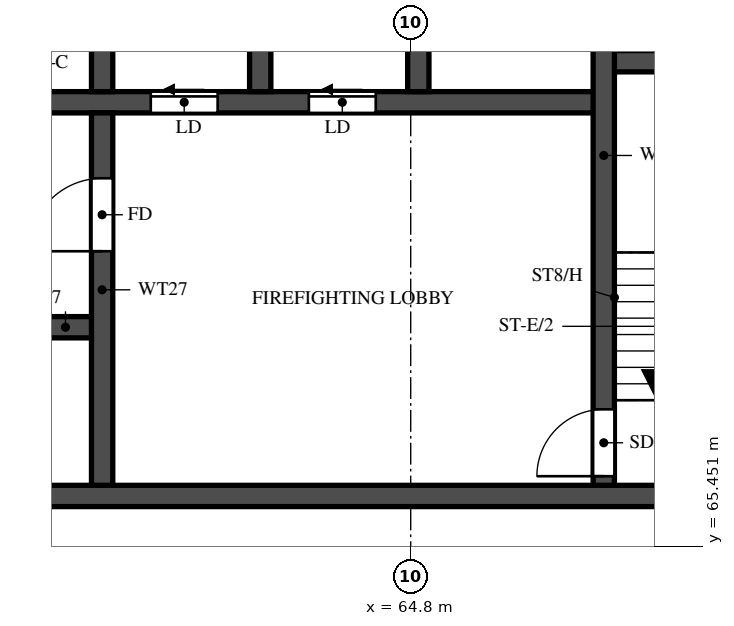
"""IFC4 building model, lengths in metres.
Left out: names, types, materials, properties, quantities, classifications, styles, units other than length and angle.
Written with IfcOpenShell. Run it as: python <this file> out.ifc"""

import sys

from ifc_helpers import new_model, si_unit, direction, frame, frame_2d, origin, place, context, subcontext, project, spatial, rectangle, extrude, element, fill, save


model = new_model("IFC4")
c1 = context("Model", 3, precision=1e-05, world=origin(), true_north=direction((0.0, 1.0)))
c2 = subcontext(c1, "Body", "Model", "MODEL_VIEW")
j1 = project(units=[si_unit("LENGTHUNIT", "METRE"), si_unit("PLANEANGLEUNIT", "RADIAN")], contexts=[c1])
p1 = place(None, origin())
s1 = spatial("IfcSite", under=j1, at=p1, CompositionType="ELEMENT")
p2 = place(p1, origin())
s2 = spatial("IfcBuilding", under=s1, at=p2, CompositionType="ELEMENT")
p3 = place(p2, frame((0.0, 0.0, 174.5)))
s3 = spatial("IfcBuildingStorey", under=s2, at=p3, CompositionType="ELEMENT", Elevation=174.5)
p4 = place(p3, frame((29.7, 66.275, 0.0), z_axis=(0.0, 0.0, 1.0), x_axis=(1.0, 0.0, 0.0)))
e1 = element("IfcWall", 1, at=p4, inside=s3, PredefinedType="SHEAR", context=c2, shape_type="SweptSolid", body=[
    extrude(rectangle(XDim=41.4, YDim=0.35, at=frame_2d((20.7, 0.0))), origin(), (0.0, 0.0, 1.0), 3.2),
])
p5 = place(p4, frame((0.925, 0.0, 0.0)))
e2 = element("IfcOpeningElement", 2, at=p5, cuts=e1, PredefinedType="OPENING", context=c2, shape_type="SweptSolid", body=[
    extrude(rectangle(XDim=1.1, YDim=2.1, at=frame_2d((0.55, 1.05))), frame((0.0, 0.185, 0.0), z_axis=(0.0, -1.0, 0.0), x_axis=(1.0, 0.0, 0.0)), (0.0, 0.0, 1.0), 0.37),
])
p6 = place(p4, frame((3.712, 0.0, 0.0)))
e3 = element("IfcOpeningElement", 3, at=p6, cuts=e1, PredefinedType="OPENING", context=c2, shape_type="SweptSolid", body=[
    extrude(rectangle(XDim=1.8, YDim=2.1, at=frame_2d((0.9, 1.05))), frame((0.0, 0.185, 0.0), z_axis=(0.0, -1.0, 0.0), x_axis=(1.0, 0.0, 0.0)), (0.0, 0.0, 1.0), 0.37),
])
p7 = place(p3, frame((35.625, 69.05, 0.0), z_axis=(0.0, 0.0, 1.0), x_axis=(1.0, 0.0, 0.0)))
e4 = element("IfcWall", 4, at=p7, inside=s3, PredefinedType="SHEAR", context=c2, shape_type="SweptSolid", body=[
    extrude(rectangle(XDim=24.1, YDim=0.35, at=frame_2d((12.05, 0.0))), origin(), (0.0, 0.0, 1.0), 3.2),
])
p8 = place(p7, frame((1.0, 0.0, 0.0)))
e5 = element("IfcOpeningElement", 5, at=p8, cuts=e4, PredefinedType="OPENING", context=c2, shape_type="SweptSolid", body=[
    extrude(rectangle(XDim=1.1, YDim=2.1, at=frame_2d((0.55, 1.05))), frame((0.0, 0.185, 0.0), z_axis=(0.0, -1.0, 0.0), x_axis=(1.0, 0.0, 0.0)), (0.0, 0.0, 1.0), 0.37),
])
p9 = place(p7, frame((3.75, 0.0, 0.0)))
e6 = element("IfcOpeningElement", 6, at=p9, cuts=e4, PredefinedType="OPENING", context=c2, shape_type="SweptSolid", body=[
    extrude(rectangle(XDim=1.1, YDim=2.1, at=frame_2d((0.55, 1.05))), frame((0.0, 0.185, 0.0), z_axis=(0.0, -1.0, 0.0), x_axis=(1.0, 0.0, 0.0)), (0.0, 0.0, 1.0), 0.37),
])
p10 = place(p7, frame((6.5, 0.0, 0.0)))
e7 = element("IfcOpeningElement", 7, at=p10, cuts=e4, PredefinedType="OPENING", context=c2, shape_type="SweptSolid", body=[
    extrude(rectangle(XDim=1.1, YDim=2.1, at=frame_2d((0.55, 1.05))), frame((0.0, 0.185, 0.0), z_axis=(0.0, -1.0, 0.0), x_axis=(1.0, 0.0, 0.0)), (0.0, 0.0, 1.0), 0.37),
])
p11 = place(p7, frame((9.25, 0.0, 0.0)))
e8 = element("IfcOpeningElement", 8, at=p11, cuts=e4, PredefinedType="OPENING", context=c2, shape_type="SweptSolid", body=[
    extrude(rectangle(XDim=1.1, YDim=2.1, at=frame_2d((0.55, 1.05))), frame((0.0, 0.185, 0.0), z_axis=(0.0, -1.0, 0.0), x_axis=(1.0, 0.0, 0.0)), (0.0, 0.0, 1.0), 0.37),
])
p12 = place(p7, frame((12.0, 0.0, 0.0)))
e9 = element("IfcOpeningElement", 9, at=p12, cuts=e4, PredefinedType="OPENING", context=c2, shape_type="SweptSolid", body=[
    extrude(rectangle(XDim=1.1, YDim=2.1, at=frame_2d((0.55, 1.05))), frame((0.0, 0.185, 0.0), z_axis=(0.0, -1.0, 0.0), x_axis=(1.0, 0.0, 0.0)), (0.0, 0.0, 1.0), 0.37),
])
p13 = place(p7, frame((14.75, 0.0, 0.0)))
e10 = element("IfcOpeningElement", 10, at=p13, cuts=e4, PredefinedType="OPENING", context=c2, shape_type="SweptSolid", body=[
    extrude(rectangle(XDim=1.1, YDim=2.1, at=frame_2d((0.55, 1.05))), frame((0.0, 0.185, 0.0), z_axis=(0.0, -1.0, 0.0), x_axis=(1.0, 0.0, 0.0)), (0.0, 0.0, 1.0), 0.37),
])
p14 = place(p7, frame((17.625, 0.0, 0.0)))
e11 = element("IfcOpeningElement", 11, at=p14, cuts=e4, PredefinedType="OPENING", context=c2, shape_type="SweptSolid", body=[
    extrude(rectangle(XDim=1.1, YDim=2.1, at=frame_2d((0.55, 1.05))), frame((0.0, 0.185, 0.0), z_axis=(0.0, -1.0, 0.0), x_axis=(1.0, 0.0, 0.0)), (0.0, 0.0, 1.0), 0.37),
])
p15 = place(p7, frame((20.625, 0.0, 0.0)))
e12 = element("IfcOpeningElement", 12, at=p15, cuts=e4, PredefinedType="OPENING", context=c2, shape_type="SweptSolid", body=[
    extrude(rectangle(XDim=1.1, YDim=2.1, at=frame_2d((0.55, 1.05))), frame((0.0, 0.185, 0.0), z_axis=(0.0, -1.0, 0.0), x_axis=(1.0, 0.0, 0.0)), (0.0, 0.0, 1.0), 0.37),
])
p16 = place(p3, frame((32.825, 72.75, 0.0), z_axis=(0.0, 0.0, 1.0), x_axis=(1.0, 0.0, 0.0)))
e13 = element("IfcWall", 13, at=p16, inside=s3, PredefinedType="SHEAR", context=c2, shape_type="SweptSolid", body=[
    extrude(rectangle(XDim=35.15, YDim=0.35, at=frame_2d((17.575, 0.0))), origin(), (0.0, 0.0, 1.0), 3.2),
])
p17 = place(p16, frame((19.8, 0.0, 0.0)))
e14 = element("IfcOpeningElement", 14, at=p17, cuts=e13, PredefinedType="OPENING", context=c2, shape_type="SweptSolid", body=[
    extrude(rectangle(XDim=1.1, YDim=2.1, at=frame_2d((0.55, 1.05))), frame((0.0, 0.185, 0.0), z_axis=(0.0, -1.0, 0.0), x_axis=(1.0, 0.0, 0.0)), (0.0, 0.0, 1.0), 0.37),
])
p18 = place(p16, frame((27.7, 0.0, 0.0)))
e15 = element("IfcOpeningElement", 15, at=p18, cuts=e13, PredefinedType="OPENING", context=c2, shape_type="SweptSolid", body=[
    extrude(rectangle(XDim=1.1, YDim=2.1, at=frame_2d((0.55, 1.05))), frame((0.0, 0.185, 0.0), z_axis=(0.0, -1.0, 0.0), x_axis=(1.0, 0.0, 0.0)), (0.0, 0.0, 1.0), 0.37),
])
p19 = place(p16, frame((30.3, 0.0, 0.0)))
e16 = element("IfcOpeningElement", 16, at=p19, cuts=e13, PredefinedType="OPENING", context=c2, shape_type="SweptSolid", body=[
    extrude(rectangle(XDim=1.1, YDim=2.1, at=frame_2d((0.55, 1.05))), frame((0.0, 0.185, 0.0), z_axis=(0.0, -1.0, 0.0), x_axis=(1.0, 0.0, 0.0)), (0.0, 0.0, 1.0), 0.37),
])
p20 = place(p16, frame((3.8, 0.0, 0.0)))
e17 = element("IfcOpeningElement", 17, at=p20, cuts=e13, PredefinedType="OPENING", context=c2, shape_type="SweptSolid", body=[
    extrude(rectangle(XDim=1.1, YDim=2.1, at=frame_2d((0.55, 1.05))), frame((0.0, 0.185, 0.0), z_axis=(0.0, -1.0, 0.0), x_axis=(1.0, 0.0, 0.0)), (0.0, 0.0, 1.0), 0.37),
])
p21 = place(p16, frame((6.55, 0.0, 0.0)))
e18 = element("IfcOpeningElement", 18, at=p21, cuts=e13, PredefinedType="OPENING", context=c2, shape_type="SweptSolid", body=[
    extrude(rectangle(XDim=1.1, YDim=2.1, at=frame_2d((0.55, 1.05))), frame((0.0, 0.185, 0.0), z_axis=(0.0, -1.0, 0.0), x_axis=(1.0, 0.0, 0.0)), (0.0, 0.0, 1.0), 0.37),
])
p22 = place(p16, frame((9.3, 0.0, 0.0)))
e19 = element("IfcOpeningElement", 19, at=p22, cuts=e13, PredefinedType="OPENING", context=c2, shape_type="SweptSolid", body=[
    extrude(rectangle(XDim=1.1, YDim=2.1, at=frame_2d((0.55, 1.05))), frame((0.0, 0.185, 0.0), z_axis=(0.0, -1.0, 0.0), x_axis=(1.0, 0.0, 0.0)), (0.0, 0.0, 1.0), 0.37),
])
p23 = place(p16, frame((12.05, 0.0, 0.0)))
e20 = element("IfcOpeningElement", 20, at=p23, cuts=e13, PredefinedType="OPENING", context=c2, shape_type="SweptSolid", body=[
    extrude(rectangle(XDim=1.1, YDim=2.1, at=frame_2d((0.55, 1.05))), frame((0.0, 0.185, 0.0), z_axis=(0.0, -1.0, 0.0), x_axis=(1.0, 0.0, 0.0)), (0.0, 0.0, 1.0), 0.37),
])
p24 = place(p16, frame((14.8, 0.0, 0.0)))
e21 = element("IfcOpeningElement", 21, at=p24, cuts=e13, PredefinedType="OPENING", context=c2, shape_type="SweptSolid", body=[
    extrude(rectangle(XDim=1.1, YDim=2.1, at=frame_2d((0.55, 1.05))), frame((0.0, 0.185, 0.0), z_axis=(0.0, -1.0, 0.0), x_axis=(1.0, 0.0, 0.0)), (0.0, 0.0, 1.0), 0.37),
])
p25 = place(p16, frame((17.55, 0.0, 0.0)))
e22 = element("IfcOpeningElement", 22, at=p25, cuts=e13, PredefinedType="OPENING", context=c2, shape_type="SweptSolid", body=[
    extrude(rectangle(XDim=1.1, YDim=2.1, at=frame_2d((0.55, 1.05))), frame((0.0, 0.185, 0.0), z_axis=(0.0, -1.0, 0.0), x_axis=(1.0, 0.0, 0.0)), (0.0, 0.0, 1.0), 0.37),
])
p26 = place(p16, frame((0.938, 0.0, 0.0)))
e23 = element("IfcOpeningElement", 23, at=p26, cuts=e13, PredefinedType="OPENING", context=c2, shape_type="SweptSolid", body=[
    extrude(rectangle(XDim=1.1, YDim=2.1, at=frame_2d((0.55, 1.05))), frame((0.0, 0.185, 0.0), z_axis=(0.0, -1.0, 0.0), x_axis=(1.0, 0.0, 0.0)), (0.0, 0.0, 1.0), 0.37),
])
p27 = place(p3, frame((67.975, 73.425, 0.0), z_axis=(0.0, 0.0, 1.0), x_axis=(1.0, 0.0, 0.0)))
e24 = element("IfcWall", 24, at=p27, inside=s3, PredefinedType="SHEAR", context=c2, shape_type="SweptSolid", body=[
    extrude(rectangle(XDim=3.125, YDim=0.35, at=frame_2d((1.562, 0.0))), origin(), (0.0, 0.0, 1.0), 3.2),
])
p28 = place(p3, frame((67.975, 66.45, 0.0), z_axis=(0.0, 0.0, 1.0), x_axis=(0.0, 1.0, 0.0)))
e25 = element("IfcWall", 25, at=p28, inside=s3, PredefinedType="SHEAR", context=c2, shape_type="SweptSolid", body=[
    extrude(rectangle(XDim=10.85, YDim=0.35, at=frame_2d((5.425, 0.0))), origin(), (0.0, 0.0, 1.0), 3.2),
])
p29 = place(p28, frame((0.15, 0.0, 0.0)))
e26 = element("IfcOpeningElement", 26, at=p29, cuts=e25, PredefinedType="OPENING", context=c2, shape_type="SweptSolid", body=[
    extrude(rectangle(XDim=1.1, YDim=2.1, at=frame_2d((0.55, 1.05))), frame((0.0, 0.185, 0.0), z_axis=(0.0, -1.0, 0.0), x_axis=(1.0, 0.0, 0.0)), (0.0, 0.0, 1.0), 0.37),
])
p30 = place(p3, frame((59.725, 66.45, 0.0), z_axis=(0.0, 0.0, 1.0), x_axis=(0.0, 1.0, 0.0)))
e27 = element("IfcWall", 27, at=p30, inside=s3, PredefinedType="SHEAR", context=c2, shape_type="SweptSolid", body=[
    extrude(rectangle(XDim=6.125, YDim=0.35, at=frame_2d((3.062, 0.0))), origin(), (0.0, 0.0, 1.0), 3.2),
])
p31 = place(p30, frame((3.85, 0.0, 0.0)))
e28 = element("IfcOpeningElement", 28, at=p31, cuts=e27, PredefinedType="OPENING", context=c2, shape_type="SweptSolid", body=[
    extrude(rectangle(XDim=1.2, YDim=2.1, at=frame_2d((0.6, 1.05))), frame((0.0, 0.185, 0.0), z_axis=(0.0, -1.0, 0.0), x_axis=(1.0, 0.0, 0.0)), (0.0, 0.0, 1.0), 0.37),
])
for number, where, z_axis, x_axis in (
    (29, (59.725, 72.925, 0.0), (0.0, 0.0, 1.0), (0.0, 1.0, 0.0)),
    (30, (62.325, 72.925, 0.0), (0.0, 0.0, 1.0), (0.0, 1.0, 0.0)),
    (31, (64.925, 72.925, 0.0), (0.0, 0.0, 1.0), (0.0, 1.0, 0.0)),
):
    element("IfcWall", number, at=place(p3, frame(where, z_axis=z_axis, x_axis=x_axis)), inside=s3, PredefinedType="SHEAR", context=c2, shape_type="SweptSolid", body=[
        extrude(rectangle(XDim=2.95, YDim=0.35, at=frame_2d((1.475, 0.0))), origin(), (0.0, 0.0, 1.0), 3.2),
    ])
p32 = place(p29, origin())
e32 = element("IfcDoor", 32, at=p32, inside=s3, OperationType="SINGLE_SWING_LEFT", PredefinedType="DOOR", context=c2, shape_type="SweptSolid", body=[
    extrude(rectangle(XDim=1.1, YDim=2.1, at=frame_2d((0.55, 1.05))), frame((0.0, 0.025, 0.0), z_axis=(0.0, -1.0, 0.0), x_axis=(1.0, 0.0, 0.0)), (0.0, 0.0, 1.0), 0.05),
])
fill(e26, e32)
p33 = place(p31, origin())
e33 = element("IfcDoor", 33, at=p33, inside=s3, OperationType="SINGLE_SWING_LEFT", PredefinedType="DOOR", context=c2, shape_type="SweptSolid", body=[
    extrude(rectangle(XDim=1.2, YDim=2.1, at=frame_2d((0.6, 1.05))), frame((0.0, 0.025, 0.0), z_axis=(0.0, -1.0, 0.0), x_axis=(1.0, 0.0, 0.0)), (0.0, 0.0, 1.0), 0.05),
])
fill(e28, e33)
p34 = place(p18, origin())
e34 = element("IfcDoor", 34, at=p34, inside=s3, OperationType="SLIDING_TO_LEFT", PredefinedType="DOOR", context=c2, shape_type="SweptSolid", body=[
    extrude(rectangle(XDim=1.1, YDim=2.1, at=frame_2d((0.55, 1.05))), frame((0.0, 0.025, 0.0), z_axis=(0.0, -1.0, 0.0), x_axis=(1.0, 0.0, 0.0)), (0.0, 0.0, 1.0), 0.05),
])
fill(e15, e34)
p35 = place(p19, origin())
e35 = element("IfcDoor", 35, at=p35, inside=s3, OperationType="SLIDING_TO_LEFT", PredefinedType="DOOR", context=c2, shape_type="SweptSolid", body=[
    extrude(rectangle(XDim=1.1, YDim=2.1, at=frame_2d((0.55, 1.05))), frame((0.0, 0.025, 0.0), z_axis=(0.0, -1.0, 0.0), x_axis=(1.0, 0.0, 0.0)), (0.0, 0.0, 1.0), 0.05),
])
fill(e16, e35)
save(model, sys.argv[1])
